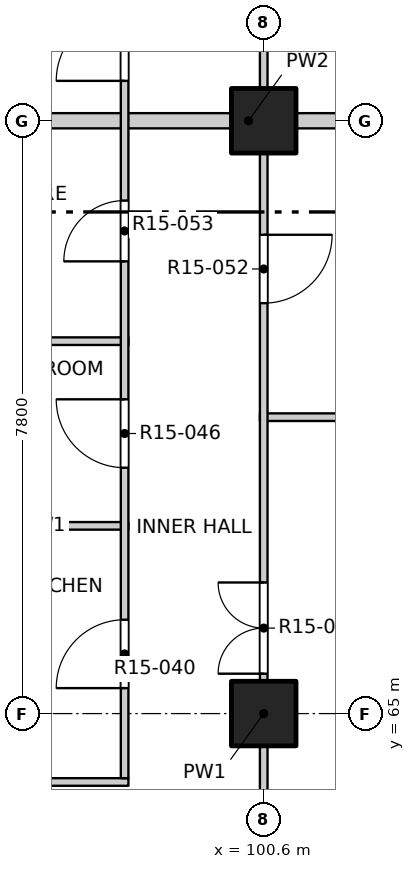
"""IFC4 building model, lengths in metres.
Left out: names, types, materials, properties, quantities, classifications, styles, units other than length and angle.
Written with IfcOpenShell. Run it as: python <this file> out.ifc"""

import sys

from ifc_helpers import new_model, si_unit, direction, frame, frame_2d, origin, origin_2d, place, context, subcontext, project, spatial, rectangle, extrude, element, fill, save


model = new_model("IFC4")
c1 = context("Model", 3, precision=1e-05, world=origin(), true_north=direction((0.0, 1.0)))
c2 = subcontext(c1, "Body", "Model", "MODEL_VIEW")
j1 = project(units=[si_unit("LENGTHUNIT", "METRE"), si_unit("PLANEANGLEUNIT", "RADIAN")], contexts=[c1])
p1 = place(None, origin())
s1 = spatial("IfcSite", under=j1, at=p1, CompositionType="ELEMENT")
p2 = place(p1, origin())
s2 = spatial("IfcBuilding", under=s1, at=p2, CompositionType="ELEMENT")
p3 = place(p2, frame((0.0, 0.0, 158.8)))
s3 = spatial("IfcBuildingStorey", under=s2, at=p3, CompositionType="ELEMENT", Elevation=158.8)
for number, where, z_axis, x_axis in (
    (1, (100.6, 65.0, -0.25), (0.0, 0.0, 1.0), (1.0, 0.0, 0.0)),
    (2, (100.6, 72.8, -0.25), (0.0, 0.0, 1.0), (1.0, 0.0, 0.0)),
):
    element("IfcColumn", number, at=place(p3, frame(where, z_axis=z_axis, x_axis=x_axis)), inside=s3, PredefinedType="COLUMN", context=c2, shape_type="SweptSolid", body=[
        extrude(rectangle(XDim=0.85, YDim=0.85, at=origin_2d()), origin(), (0.0, 0.0, 1.0), 3.4),
    ])
for number, where, z_axis, x_axis in (
    (3, (96.6, 64.1, 0.0), (0.0, 0.0, 1.0), (1.0, 0.0, 0.0)),
    (4, (96.6, 67.47, 0.0), (0.0, 0.0, 1.0), (1.0, 0.0, 0.0)),
):
    element("IfcWall", number, at=place(p3, frame(where, z_axis=z_axis, x_axis=x_axis)), inside=s3, PredefinedType="PARTITIONING", context=c2, shape_type="SweptSolid", body=[
        extrude(rectangle(XDim=2.22, YDim=0.1, at=frame_2d((1.11, 0.0))), origin(), (0.0, 0.0, 1.0), 3.15),
    ])
p4 = place(p3, frame((100.55, 68.9, 0.0), z_axis=(0.0, 0.0, 1.0), x_axis=(1.0, 0.0, 0.0)))
e5 = element("IfcWall", 5, at=p4, inside=s3, PredefinedType="PARTITIONING", context=c2, shape_type="SweptSolid", body=[
    extrude(rectangle(XDim=3.65, YDim=0.1, at=frame_2d((1.825, 0.0))), origin(), (0.0, 0.0, 1.0), 2.55),
])
p5 = place(p3, frame((96.6, 69.9, 0.0), z_axis=(0.0, 0.0, 1.0), x_axis=(1.0, 0.0, 0.0)))
e6 = element("IfcWall", 6, at=p5, inside=s3, PredefinedType="PARTITIONING", context=c2, shape_type="SweptSolid", body=[
    extrude(rectangle(XDim=2.22, YDim=0.1, at=frame_2d((1.11, 0.0))), origin(), (0.0, 0.0, 1.0), 3.15),
])
p6 = place(p3, frame((96.6, 72.8, 0.0), z_axis=(0.0, 0.0, 1.0), x_axis=(1.0, 0.0, 0.0)))
e7 = element("IfcWall", 7, at=p6, inside=s3, PredefinedType="PARTITIONING", context=c2, shape_type="SweptSolid", body=[
    extrude(rectangle(XDim=7.6, YDim=0.2, at=frame_2d((3.8, 0.0))), origin(), (0.0, 0.0, 1.0), 3.15),
])
p7 = place(p3, frame((98.77, 64.15, 0.0), z_axis=(0.0, 0.0, 1.0), x_axis=(0.0, 1.0, 0.0)))
e8 = element("IfcWall", 8, at=p7, inside=s3, PredefinedType="PARTITIONING", context=c2, shape_type="SweptSolid", body=[
    extrude(rectangle(XDim=13.2, YDim=0.1, at=frame_2d((6.6, 0.0))), origin(), (0.0, 0.0, 1.0), 3.15),
])
p8 = place(p7, frame((1.185, 0.0, 0.0)))
e9 = element("IfcOpeningElement", 9, at=p8, cuts=e8, PredefinedType="OPENING", context=c2, shape_type="SweptSolid", body=[
    extrude(rectangle(XDim=0.9, YDim=2.1, at=frame_2d((0.45, 1.05))), frame((0.0, 0.06, 0.0), z_axis=(0.0, -1.0, 0.0), x_axis=(1.0, 0.0, 0.0)), (0.0, 0.0, 1.0), 0.12),
])
p9 = place(p7, frame((4.085, 0.0, 0.0)))
e10 = element("IfcOpeningElement", 10, at=p9, cuts=e8, PredefinedType="OPENING", context=c2, shape_type="SweptSolid", body=[
    extrude(rectangle(XDim=0.9, YDim=2.1, at=frame_2d((0.45, 1.05))), frame((0.0, 0.06, 0.0), z_axis=(0.0, -1.0, 0.0), x_axis=(1.0, 0.0, 0.0)), (0.0, 0.0, 1.0), 0.12),
])
p10 = place(p7, frame((6.8, 0.0, 0.0)))
e11 = element("IfcOpeningElement", 11, at=p10, cuts=e8, PredefinedType="OPENING", context=c2, shape_type="SweptSolid", body=[
    extrude(rectangle(XDim=0.8, YDim=2.1, at=frame_2d((0.4, 1.05))), frame((0.0, 0.06, 0.0), z_axis=(0.0, -1.0, 0.0), x_axis=(1.0, 0.0, 0.0)), (0.0, 0.0, 1.0), 0.12),
])
p11 = place(p7, frame((9.175, 0.0, 0.0)))
e12 = element("IfcOpeningElement", 12, at=p11, cuts=e8, PredefinedType="OPENING", context=c2, shape_type="SweptSolid", body=[
    extrude(rectangle(XDim=0.9, YDim=2.1, at=frame_2d((0.45, 1.05))), frame((0.0, 0.06, 0.0), z_axis=(0.0, -1.0, 0.0), x_axis=(1.0, 0.0, 0.0)), (0.0, 0.0, 1.0), 0.12),
])
p12 = place(p7, frame((11.475, 0.0, 0.0)))
e13 = element("IfcOpeningElement", 13, at=p12, cuts=e8, PredefinedType="OPENING", context=c2, shape_type="SweptSolid", body=[
    extrude(rectangle(XDim=0.9, YDim=2.1, at=frame_2d((0.45, 1.05))), frame((0.0, 0.06, 0.0), z_axis=(0.0, -1.0, 0.0), x_axis=(1.0, 0.0, 0.0)), (0.0, 0.0, 1.0), 0.12),
])
p13 = place(p3, frame((100.6, 45.8, 0.0), z_axis=(0.0, 0.0, 1.0), x_axis=(0.0, 1.0, 0.0)))
e14 = element("IfcWall", 14, at=p13, inside=s3, PredefinedType="PARTITIONING", context=c2, shape_type="SweptSolid", body=[
    extrude(rectangle(XDim=38.4, YDim=0.1, at=frame_2d((19.2, 0.0))), origin(), (0.0, 0.0, 1.0), 3.15),
])
p14 = place(p13, frame((1.05, 0.0, 0.0)))
e15 = element("IfcOpeningElement", 15, at=p14, cuts=e14, PredefinedType="OPENING", context=c2, shape_type="SweptSolid", body=[
    extrude(rectangle(XDim=1.2, YDim=2.1, at=frame_2d((0.6, 1.05))), frame((0.0, 0.06, 0.0), z_axis=(0.0, -1.0, 0.0), x_axis=(1.0, 0.0, 0.0)), (0.0, 0.0, 1.0), 0.12),
])
p15 = place(p13, frame((5.1, 0.0, 0.0)))
e16 = element("IfcOpeningElement", 16, at=p15, cuts=e14, PredefinedType="OPENING", context=c2, shape_type="SweptSolid", body=[
    extrude(rectangle(XDim=0.9, YDim=2.1, at=frame_2d((0.45, 1.05))), frame((0.0, 0.06, 0.0), z_axis=(0.0, -1.0, 0.0), x_axis=(1.0, 0.0, 0.0)), (0.0, 0.0, 1.0), 0.12),
])
p16 = place(p13, frame((9.0, 0.0, 0.0)))
e17 = element("IfcOpeningElement", 17, at=p16, cuts=e14, PredefinedType="OPENING", context=c2, shape_type="SweptSolid", body=[
    extrude(rectangle(XDim=0.9, YDim=2.1, at=frame_2d((0.45, 1.05))), frame((0.0, 0.06, 0.0), z_axis=(0.0, -1.0, 0.0), x_axis=(1.0, 0.0, 0.0)), (0.0, 0.0, 1.0), 0.12),
])
p17 = place(p13, frame((12.9, 0.0, 0.0)))
e18 = element("IfcOpeningElement", 18, at=p17, cuts=e14, PredefinedType="OPENING", context=c2, shape_type="SweptSolid", body=[
    extrude(rectangle(XDim=0.9, YDim=2.1, at=frame_2d((0.45, 1.05))), frame((0.0, 0.06, 0.0), z_axis=(0.0, -1.0, 0.0), x_axis=(1.0, 0.0, 0.0)), (0.0, 0.0, 1.0), 0.12),
])
p18 = place(p13, frame((19.725, 0.0, 0.0)))
e19 = element("IfcOpeningElement", 19, at=p18, cuts=e14, PredefinedType="OPENING", context=c2, shape_type="SweptSolid", body=[
    extrude(rectangle(XDim=1.2, YDim=2.1, at=frame_2d((0.6, 1.05))), frame((0.0, 0.06, 0.0), z_axis=(0.0, -1.0, 0.0), x_axis=(1.0, 0.0, 0.0)), (0.0, 0.0, 1.0), 0.12),
])
p19 = place(p13, frame((24.6, 0.0, 0.0)))
e20 = element("IfcOpeningElement", 20, at=p19, cuts=e14, PredefinedType="OPENING", context=c2, shape_type="SweptSolid", body=[
    extrude(rectangle(XDim=0.9, YDim=2.1, at=frame_2d((0.45, 1.05))), frame((0.0, 0.06, 0.0), z_axis=(0.0, -1.0, 0.0), x_axis=(1.0, 0.0, 0.0)), (0.0, 0.0, 1.0), 0.12),
])
p20 = place(p13, frame((30.3, 0.0, 0.0)))
e21 = element("IfcOpeningElement", 21, at=p20, cuts=e14, PredefinedType="OPENING", context=c2, shape_type="SweptSolid", body=[
    extrude(rectangle(XDim=1.2, YDim=2.1, at=frame_2d((0.6, 1.05))), frame((0.0, 0.06, 0.0), z_axis=(0.0, -1.0, 0.0), x_axis=(1.0, 0.0, 0.0)), (0.0, 0.0, 1.0), 0.12),
])
p21 = place(p13, frame((36.15, 0.0, 0.0)))
e22 = element("IfcOpeningElement", 22, at=p21, cuts=e14, PredefinedType="OPENING", context=c2, shape_type="SweptSolid", body=[
    extrude(rectangle(XDim=1.2, YDim=2.1, at=frame_2d((0.6, 1.05))), frame((0.0, 0.06, 0.0), z_axis=(0.0, -1.0, 0.0), x_axis=(1.0, 0.0, 0.0)), (0.0, 0.0, 1.0), 0.12),
])
p22 = place(p8, origin())
e23 = element("IfcDoor", 23, at=p22, inside=s3, OperationType="SINGLE_SWING_LEFT", PredefinedType="DOOR", context=c2, shape_type="SweptSolid", body=[
    extrude(rectangle(XDim=0.9, YDim=2.1, at=frame_2d((0.45, 1.05))), frame((0.0, 0.025, 0.0), z_axis=(0.0, -1.0, 0.0), x_axis=(1.0, 0.0, 0.0)), (0.0, 0.0, 1.0), 0.05),
])
fill(e9, e23)
p23 = place(p18, origin())
e24 = element("IfcDoor", 24, at=p23, inside=s3, OperationType="DOUBLE_DOOR_SINGLE_SWING", PredefinedType="DOOR", context=c2, shape_type="SweptSolid", body=[
    extrude(rectangle(XDim=1.2, YDim=2.1, at=frame_2d((0.6, 1.05))), frame((0.0, 0.025, 0.0), z_axis=(0.0, -1.0, 0.0), x_axis=(1.0, 0.0, 0.0)), (0.0, 0.0, 1.0), 0.05),
])
fill(e19, e24)
p24 = place(p9, origin())
e25 = element("IfcDoor", 25, at=p24, inside=s3, OperationType="SINGLE_SWING_RIGHT", PredefinedType="DOOR", context=c2, shape_type="SweptSolid", body=[
    extrude(rectangle(XDim=0.9, YDim=2.1, at=frame_2d((0.45, 1.05))), frame((0.0, 0.025, 0.0), z_axis=(0.0, -1.0, 0.0), x_axis=(1.0, 0.0, 0.0)), (0.0, 0.0, 1.0), 0.05),
])
fill(e10, e25)
p25 = place(p19, origin())
e26 = element("IfcDoor", 26, at=p25, inside=s3, OperationType="SINGLE_SWING_LEFT", PredefinedType="DOOR", context=c2, shape_type="SweptSolid", body=[
    extrude(rectangle(XDim=0.9, YDim=2.1, at=frame_2d((0.45, 1.05))), frame((0.0, 0.025, 0.0), z_axis=(0.0, -1.0, 0.0), x_axis=(1.0, 0.0, 0.0)), (0.0, 0.0, 1.0), 0.05),
])
fill(e20, e26)
p26 = place(p10, origin())
e27 = element("IfcDoor", 27, at=p26, inside=s3, OperationType="SINGLE_SWING_LEFT", PredefinedType="DOOR", context=c2, shape_type="SweptSolid", body=[
    extrude(rectangle(XDim=0.8, YDim=2.1, at=frame_2d((0.4, 1.05))), frame((0.0, 0.025, 0.0), z_axis=(0.0, -1.0, 0.0), x_axis=(1.0, 0.0, 0.0)), (0.0, 0.0, 1.0), 0.05),
])
fill(e11, e27)
p27 = place(p11, origin())
e28 = element("IfcDoor", 28, at=p27, inside=s3, OperationType="SINGLE_SWING_LEFT", PredefinedType="DOOR", context=c2, shape_type="SweptSolid", body=[
    extrude(rectangle(XDim=0.9, YDim=2.1, at=frame_2d((0.45, 1.05))), frame((0.0, 0.025, 0.0), z_axis=(0.0, -1.0, 0.0), x_axis=(1.0, 0.0, 0.0)), (0.0, 0.0, 1.0), 0.05),
])
fill(e12, e28)
save(model, sys.argv[1])
